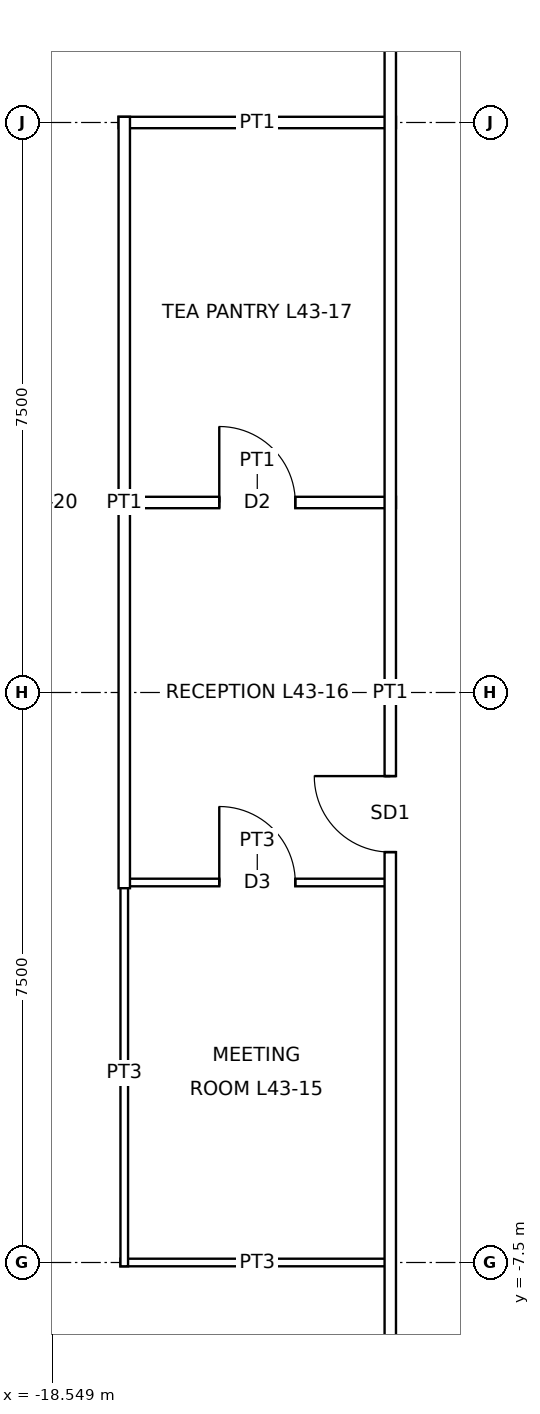
"""IFC4 building model, lengths in metres.
Left out: names, types, materials, properties, quantities, classifications, styles, units other than length and angle.
Written with IfcOpenShell. Run it as: python <this file> out.ifc"""

import sys

from ifc_helpers import new_model, si_unit, direction, frame, frame_2d, origin, place, context, subcontext, project, spatial, rectangle, extrude, element, fill, save


model = new_model("IFC4")
c1 = context("Model", 3, precision=1e-05, world=origin(), true_north=direction((0.0, 1.0)))
c2 = subcontext(c1, "Body", "Model", "MODEL_VIEW")
j1 = project(units=[si_unit("LENGTHUNIT", "METRE"), si_unit("PLANEANGLEUNIT", "RADIAN")], contexts=[c1])
p1 = place(None, origin())
s1 = spatial("IfcSite", under=j1, at=p1, CompositionType="ELEMENT")
p2 = place(p1, origin())
s2 = spatial("IfcBuilding", under=s1, at=p2, CompositionType="ELEMENT")
p3 = place(p2, frame((0.0, 0.0, 205.9)))
s3 = spatial("IfcBuildingStorey", under=s2, at=p3, CompositionType="ELEMENT", Elevation=205.9)
p4 = place(p3, frame((-17.65, -7.5, 0.0), z_axis=(0.0, 0.0, 1.0), x_axis=(1.0, 0.0, 0.0)))
e1 = element("IfcWall", 1, at=p4, inside=s3, PredefinedType="PARTITIONING", context=c2, shape_type="SweptSolid", body=[
    extrude(rectangle(XDim=3.6, YDim=0.1, at=frame_2d((1.8, 0.0))), origin(), (0.0, 0.0, 1.0), 3.238),
])
p5 = place(p3, frame((-17.65, -2.5, 0.0), z_axis=(0.0, 0.0, 1.0), x_axis=(1.0, 0.0, 0.0)))
e2 = element("IfcWall", 2, at=p5, inside=s3, PredefinedType="PARTITIONING", context=c2, shape_type="SweptSolid", body=[
    extrude(rectangle(XDim=3.6, YDim=0.1, at=frame_2d((1.8, 0.0))), origin(), (0.0, 0.0, 1.0), 3.85),
])
p6 = place(p5, frame((1.3, 0.0, 0.0)))
e3 = element("IfcOpeningElement", 3, at=p6, cuts=e2, PredefinedType="OPENING", context=c2, shape_type="SweptSolid", body=[
    extrude(rectangle(XDim=1.0, YDim=2.1, at=frame_2d((0.5, 1.05))), frame((0.0, 0.06, 0.0), z_axis=(0.0, -1.0, 0.0), x_axis=(1.0, 0.0, 0.0)), (0.0, 0.0, 1.0), 0.12),
])
p7 = place(p3, frame((-17.675, 2.5, 0.0), z_axis=(0.0, 0.0, 1.0), x_axis=(1.0, 0.0, 0.0)))
e4 = element("IfcWall", 4, at=p7, inside=s3, PredefinedType="PARTITIONING", context=c2, shape_type="SweptSolid", body=[
    extrude(rectangle(XDim=3.65, YDim=0.15, at=frame_2d((1.825, 0.0))), origin(), (0.0, 0.0, 1.0), 3.85),
])
p8 = place(p7, frame((1.325, 0.0, 0.0)))
e5 = element("IfcOpeningElement", 5, at=p8, cuts=e4, PredefinedType="OPENING", context=c2, shape_type="SweptSolid", body=[
    extrude(rectangle(XDim=1.0, YDim=2.1, at=frame_2d((0.5, 1.05))), frame((0.0, 0.085, 0.0), z_axis=(0.0, -1.0, 0.0), x_axis=(1.0, 0.0, 0.0)), (0.0, 0.0, 1.0), 0.17),
])
p9 = place(p3, frame((-17.675, 7.5, 0.0), z_axis=(0.0, 0.0, 1.0), x_axis=(1.0, 0.0, 0.0)))
e6 = element("IfcWall", 6, at=p9, inside=s3, PredefinedType="PARTITIONING", context=c2, shape_type="SweptSolid", body=[
    extrude(rectangle(XDim=3.65, YDim=0.15, at=frame_2d((1.825, 0.0))), origin(), (0.0, 0.0, 1.0), 3.238),
])
p10 = place(p3, frame((-17.6, -7.55, 0.0), z_axis=(0.0, 0.0, 1.0), x_axis=(0.0, 1.0, 0.0)))
e7 = element("IfcWall", 7, at=p10, inside=s3, PredefinedType="PARTITIONING", context=c2, shape_type="SweptSolid", body=[
    extrude(rectangle(XDim=5.1, YDim=0.1, at=frame_2d((2.55, 0.0))), origin(), (0.0, 0.0, 1.0), 3.85),
])
p11 = place(p3, frame((-17.6, -2.575, 0.0), z_axis=(0.0, 0.0, 1.0), x_axis=(0.0, 1.0, 0.0)))
e8 = element("IfcWall", 8, at=p11, inside=s3, PredefinedType="PARTITIONING", context=c2, shape_type="SweptSolid", body=[
    extrude(rectangle(XDim=10.15, YDim=0.15, at=frame_2d((5.075, 0.0))), origin(), (0.0, 0.0, 1.0), 3.85),
])
p12 = place(p3, frame((-14.1, -14.175, 0.0), z_axis=(0.0, 0.0, 1.0), x_axis=(0.0, 1.0, 0.0)))
e9 = element("IfcWall", 9, at=p12, inside=s3, PredefinedType="PARTITIONING", context=c2, shape_type="SweptSolid", body=[
    extrude(rectangle(XDim=28.35, YDim=0.15, at=frame_2d((14.175, 0.0))), origin(), (0.0, 0.0, 1.0), 3.85),
])
p13 = place(p12, frame((12.075, 0.0, 0.0)))
e10 = element("IfcOpeningElement", 10, at=p13, cuts=e9, PredefinedType="OPENING", context=c2, shape_type="SweptSolid", body=[
    extrude(rectangle(XDim=1.0, YDim=2.4, at=frame_2d((0.5, 1.2))), frame((0.0, 0.085, 0.0), z_axis=(0.0, -1.0, 0.0), x_axis=(1.0, 0.0, 0.0)), (0.0, 0.0, 1.0), 0.17),
])
p14 = place(p12, frame((2.875, 0.0, 0.0)))
e11 = element("IfcOpeningElement", 11, at=p14, cuts=e9, PredefinedType="OPENING", context=c2, shape_type="SweptSolid", body=[
    extrude(rectangle(XDim=1.0, YDim=2.4, at=frame_2d((0.5, 1.2))), frame((0.0, 0.085, 0.0), z_axis=(0.0, -1.0, 0.0), x_axis=(1.0, 0.0, 0.0)), (0.0, 0.0, 1.0), 0.17),
])
p15 = place(p6, origin())
e12 = element("IfcDoor", 12, at=p15, inside=s3, OperationType="SINGLE_SWING_LEFT", PredefinedType="DOOR", context=c2, shape_type="SweptSolid", body=[
    extrude(rectangle(XDim=1.0, YDim=2.1, at=frame_2d((0.5, 1.05))), frame((0.0, 0.025, 0.0), z_axis=(0.0, -1.0, 0.0), x_axis=(1.0, 0.0, 0.0)), (0.0, 0.0, 1.0), 0.05),
])
fill(e3, e12)
p16 = place(p13, origin())
e13 = element("IfcDoor", 13, at=p16, inside=s3, OperationType="SINGLE_SWING_RIGHT", PredefinedType="DOOR", context=c2, shape_type="SweptSolid", body=[
    extrude(rectangle(XDim=1.0, YDim=2.4, at=frame_2d((0.5, 1.2))), frame((0.0, 0.025, 0.0), z_axis=(0.0, -1.0, 0.0), x_axis=(1.0, 0.0, 0.0)), (0.0, 0.0, 1.0), 0.05),
])
fill(e10, e13)
p17 = place(p8, origin())
e14 = element("IfcDoor", 14, at=p17, inside=s3, OperationType="SINGLE_SWING_LEFT", PredefinedType="DOOR", context=c2, shape_type="SweptSolid", body=[
    extrude(rectangle(XDim=1.0, YDim=2.1, at=frame_2d((0.5, 1.05))), frame((0.0, 0.025, 0.0), z_axis=(0.0, -1.0, 0.0), x_axis=(1.0, 0.0, 0.0)), (0.0, 0.0, 1.0), 0.05),
])
fill(e5, e14)
save(model, sys.argv[1])
